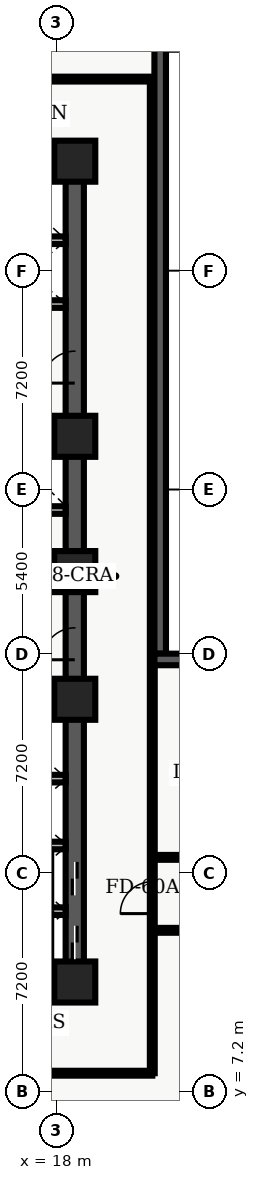
"""IFC4 building model, lengths in metres.
Left out: names, types, materials, properties, quantities, classifications, styles, units other than length and angle.
Written with IfcOpenShell. Run it as: python <this file> out.ifc"""

import sys

from ifc_helpers import new_model, entity, si_unit, converted_unit, direction, frame, origin_with_axes, origin_2d_with_axis, place, context, subcontext, project, spatial, polyline, rectangle, outline, extrude, element, fill, save


model = new_model("IFC4")
c1 = context("Model", 3, precision=1e-05, world=origin_with_axes(), true_north=direction((0.0, 1.0)))
c2 = subcontext(c1, "Body", "Model", "MODEL_VIEW")
j1 = project(units=[si_unit("LENGTHUNIT", "METRE"), converted_unit("PLANEANGLEUNIT", "DEGREE", entity("IfcPlaneAngleMeasure", 0.017), si_unit("PLANEANGLEUNIT", "RADIAN"), dimensions=[0, 0, 0, 0, 0, 0, 0])], contexts=[c1])
p1 = place(None, origin_with_axes())
s1 = spatial("IfcSite", under=j1, at=p1, CompositionType="ELEMENT")
p2 = place(p1, origin_with_axes())
s2 = spatial("IfcBuilding", under=s1, at=p2, CompositionType="ELEMENT")
p3 = place(p2, frame((0.0, 0.0, 36.6), z_axis=(0.0, 0.0, 1.0), x_axis=(1.0, 0.0, 0.0)))
s3 = spatial("IfcBuildingStorey", under=s2, at=p3, CompositionType="ELEMENT", Elevation=36.6)
p4 = place(p3, frame((11.4, 10.8, 0.0), z_axis=(0.0, 0.0, 1.0), x_axis=(1.0, 0.0, 0.0)))
e1 = element("IfcWall", 1, at=p4, inside=s3, PredefinedType="SHEAR", context=c2, shape_type="SweptSolid", body=[
    extrude(outline(polyline([(0.0, -0.3), (7.2, -0.3), (7.2, 0.3), (0.0, 0.3), (0.0, -0.3)])), origin_with_axes(), (0.0, 0.0, 1.0), 3.66),
])
p5 = place(p4, frame((2.625, 0.0, 0.0), z_axis=(0.0, 0.0, 1.0), x_axis=(1.0, 0.0, 0.0)))
e2 = element("IfcOpeningElement", 2, at=p5, cuts=e1, PredefinedType="OPENING", context=c2, shape_type="SweptSolid", body=[
    extrude(rectangle(XDim=1.05, YDim=0.62, at=origin_2d_with_axis()), origin_with_axes(), (0.0, 0.0, 1.0), 2.15),
])
p6 = place(p3, frame((11.4, 37.8, 0.0), z_axis=(0.0, 0.0, 1.0), x_axis=(1.0, 0.0, 0.0)))
e3 = element("IfcWall", 3, at=p6, inside=s3, PredefinedType="SHEAR", context=c2, shape_type="SweptSolid", body=[
    extrude(outline(polyline([(0.0, -0.3), (7.2, -0.3), (7.2, 0.3), (0.0, 0.3), (0.0, -0.3)])), origin_with_axes(), (0.0, 0.0, 1.0), 3.66),
])
p7 = place(p6, frame((2.625, 0.0, 0.0), z_axis=(0.0, 0.0, 1.0), x_axis=(1.0, 0.0, 0.0)))
e4 = element("IfcOpeningElement", 4, at=p7, cuts=e3, PredefinedType="OPENING", context=c2, shape_type="SweptSolid", body=[
    extrude(rectangle(XDim=1.05, YDim=0.62, at=origin_2d_with_axis()), origin_with_axes(), (0.0, 0.0, 1.0), 2.15),
])
p8 = place(p3, frame((18.6, 10.8, 0.0), z_axis=(0.0, 0.0, 1.0), x_axis=(0.0, 1.0, 0.0)))
e5 = element("IfcWall", 5, at=p8, inside=s3, PredefinedType="SHEAR", context=c2, shape_type="SweptSolid", body=[
    extrude(outline(polyline([(0.0, -0.3), (13.5, -0.3), (13.5, 0.3), (0.0, 0.3), (0.0, -0.3)])), origin_with_axes(), (0.0, 0.0, 1.0), 3.66),
])
p9 = place(p8, frame((1.3, 0.0, 0.0), z_axis=(0.0, 0.0, 1.0), x_axis=(1.0, 0.0, 0.0)))
e6 = element("IfcOpeningElement", 6, at=p9, cuts=e5, PredefinedType="OPENING", context=c2, shape_type="SweptSolid", body=[
    extrude(rectangle(XDim=1.1, YDim=0.62, at=origin_2d_with_axis()), origin_with_axes(), (0.0, 0.0, 1.0), 2.15),
])
p10 = place(p8, frame((3.4, 0.0, 0.0), z_axis=(0.0, 0.0, 1.0), x_axis=(1.0, 0.0, 0.0)))
e7 = element("IfcOpeningElement", 7, at=p10, cuts=e5, PredefinedType="OPENING", context=c2, shape_type="SweptSolid", body=[
    extrude(rectangle(XDim=1.1, YDim=0.62, at=origin_2d_with_axis()), origin_with_axes(), (0.0, 0.0, 1.0), 2.15),
])
p11 = place(p8, frame((11.125, 0.0, 0.0), z_axis=(0.0, 0.0, 1.0), x_axis=(1.0, 0.0, 0.0)))
e8 = element("IfcOpeningElement", 8, at=p11, cuts=e5, PredefinedType="OPENING", context=c2, shape_type="SweptSolid", body=[
    extrude(rectangle(XDim=1.05, YDim=0.62, at=origin_2d_with_axis()), origin_with_axes(), (0.0, 0.0, 1.0), 2.15),
])
p12 = place(p3, frame((18.6, 24.3, 0.0), z_axis=(0.0, 0.0, 1.0), x_axis=(0.0, 1.0, 0.0)))
e9 = element("IfcWall", 9, at=p12, inside=s3, PredefinedType="SHEAR", context=c2, shape_type="SweptSolid", body=[
    extrude(outline(polyline([(0.0, -0.3), (13.5, -0.3), (13.5, 0.3), (0.0, 0.3), (0.0, -0.3)])), origin_with_axes(), (0.0, 0.0, 1.0), 3.66),
])
p13 = place(p12, frame((6.725, 0.0, 0.0), z_axis=(0.0, 0.0, 1.0), x_axis=(1.0, 0.0, 0.0)))
e10 = element("IfcOpeningElement", 10, at=p13, cuts=e9, PredefinedType="OPENING", context=c2, shape_type="SweptSolid", body=[
    extrude(rectangle(XDim=1.05, YDim=0.62, at=origin_2d_with_axis()), origin_with_axes(), (0.0, 0.0, 1.0), 2.15),
])
for number, where, z_axis, x_axis in (
    (11, (11.7, 19.825, 0.0), (0.0, 0.0, 1.0), (1.0, 0.0, 0.0)),
    (12, (11.7, 28.775, 0.0), (0.0, 0.0, 1.0), (1.0, 0.0, 0.0)),
):
    element("IfcWall", number, at=place(p3, frame(where, z_axis=z_axis, x_axis=x_axis)), inside=s3, PredefinedType="SHEAR", context=c2, shape_type="SweptSolid", body=[
        extrude(outline(polyline([(0.0, -0.125), (6.6, -0.125), (6.6, 0.125), (0.0, 0.125), (0.0, -0.125)])), origin_with_axes(), (0.0, 0.0, 1.0), 3.66),
    ])
p14 = place(p3, frame((11.7, 24.1, 0.0), z_axis=(0.0, 0.0, 1.0), x_axis=(1.0, 0.0, 0.0)))
e13 = element("IfcWall", 13, at=p14, inside=s3, PredefinedType="SOLIDWALL", context=c2, shape_type="SweptSolid", body=[
    extrude(outline(polyline([(0.0, -0.125), (6.6, -0.125), (6.6, 0.125), (0.0, 0.125), (0.0, -0.125)])), origin_with_axes(), (0.0, 0.0, 1.0), 2.7),
])
p15 = place(p14, frame((3.75, 0.0, 0.0), z_axis=(0.0, 0.0, 1.0), x_axis=(1.0, 0.0, 0.0)))
e14 = element("IfcOpeningElement", 14, at=p15, cuts=e13, PredefinedType="OPENING", context=c2, shape_type="SweptSolid", body=[
    extrude(rectangle(XDim=0.9, YDim=0.27, at=origin_2d_with_axis()), origin_with_axes(), (0.0, 0.0, 1.0), 2.15),
])
p16 = place(p3, frame((11.7, 26.325, 0.0), z_axis=(0.0, 0.0, 1.0), x_axis=(1.0, 0.0, 0.0)))
e15 = element("IfcWall", 15, at=p16, inside=s3, PredefinedType="SOLIDWALL", context=c2, shape_type="SweptSolid", body=[
    extrude(outline(polyline([(0.0, -0.125), (6.6, -0.125), (6.6, 0.125), (0.0, 0.125), (0.0, -0.125)])), origin_with_axes(), (0.0, 0.0, 1.0), 2.7),
])
p17 = place(p16, frame((3.5, 0.0, 0.0), z_axis=(0.0, 0.0, 1.0), x_axis=(1.0, 0.0, 0.0)))
e16 = element("IfcOpeningElement", 16, at=p17, cuts=e15, PredefinedType="OPENING", context=c2, shape_type="SweptSolid", body=[
    extrude(rectangle(XDim=0.9, YDim=0.27, at=origin_2d_with_axis()), origin_with_axes(), (0.0, 0.0, 1.0), 2.15),
])
for number, where, z_axis, x_axis in (
    (17, (18.6, 10.8, 0.0), (0.0, 0.0, 1.0), (1.0, 0.0, 0.0)),
    (18, (18.6, 20.1, 0.0), (0.0, 0.0, 1.0), (1.0, 0.0, 0.0)),
    (19, (18.6, 24.3, 0.0), (0.0, 0.0, 1.0), (1.0, 0.0, 0.0)),
    (20, (18.6, 28.75, 0.0), (0.0, 0.0, 1.0), (1.0, 0.0, 0.0)),
    (21, (18.6, 37.8, 0.0), (0.0, 0.0, 1.0), (1.0, 0.0, 0.0)),
):
    element("IfcColumn", number, at=place(p3, frame(where, z_axis=z_axis, x_axis=x_axis)), inside=s3, PredefinedType="COLUMN", context=c2, shape_type="SweptSolid", body=[
        extrude(rectangle(XDim=1.35, YDim=1.35, at=origin_2d_with_axis()), origin_with_axes(), (0.0, 0.0, 1.0), 3.9),
    ])
for number, where, z_axis, x_axis in (
    (22, (15.84, 13.13, 0.0), (0.0, 0.0, 1.0), (1.0, 0.0, 0.0)),
    (23, (15.84, 15.29, 0.0), (0.0, 0.0, 1.0), (1.0, 0.0, 0.0)),
    (24, (15.84, 17.49, 0.0), (0.0, 0.0, 1.0), (1.0, 0.0, 0.0)),
    (25, (15.84, 33.1, 0.0), (0.0, 0.0, 1.0), (1.0, 0.0, 0.0)),
    (26, (15.84, 35.2, 0.0), (0.0, 0.0, 1.0), (1.0, 0.0, 0.0)),
):
    element("IfcWall", number, at=place(p3, frame(where, z_axis=z_axis, x_axis=x_axis)), inside=s3, PredefinedType="SOLIDWALL", context=c2, shape_type="SweptSolid", body=[
        extrude(outline(polyline([(0.0, -0.125), (2.46, -0.125), (2.46, 0.125), (0.0, 0.125), (0.0, -0.125)])), origin_with_axes(), (0.0, 0.0, 1.0), 2.7),
    ])
p18 = place(p3, frame((2.6, 7.8, 0.0), z_axis=(0.0, 0.0, 1.0), x_axis=(1.0, 0.0, 0.0)))
e27 = element("IfcWall", 27, at=p18, inside=s3, PredefinedType="PARTITIONING", context=c2, shape_type="SweptSolid", body=[
    extrude(outline(polyline([(0.0, -0.08), (18.55, -0.08), (18.55, 0.08), (0.0, 0.08), (0.0, -0.08)])), origin_with_axes(), (0.0, 0.0, 1.0), 2.7),
])
p19 = place(p18, frame((3.765, 0.0, 0.0), z_axis=(0.0, 0.0, 1.0), x_axis=(1.0, 0.0, 0.0)))
e28 = element("IfcOpeningElement", 28, at=p19, cuts=e27, PredefinedType="OPENING", context=c2, shape_type="SweptSolid", body=[
    extrude(rectangle(XDim=1.0, YDim=0.18, at=origin_2d_with_axis()), origin_with_axes(), (0.0, 0.0, 1.0), 2.15),
])
p20 = place(p18, frame((13.3, 0.0, 0.0), z_axis=(0.0, 0.0, 1.0), x_axis=(1.0, 0.0, 0.0)))
e29 = element("IfcOpeningElement", 29, at=p20, cuts=e27, PredefinedType="OPENING", context=c2, shape_type="SweptSolid", body=[
    extrude(rectangle(XDim=1.0, YDim=0.18, at=origin_2d_with_axis()), origin_with_axes(), (0.0, 0.0, 1.0), 2.15),
])
p21 = place(p3, frame((2.6, 40.5, 0.0), z_axis=(0.0, 0.0, 1.0), x_axis=(1.0, 0.0, 0.0)))
e30 = element("IfcWall", 30, at=p21, inside=s3, PredefinedType="PARTITIONING", context=c2, shape_type="SweptSolid", body=[
    extrude(outline(polyline([(0.0, -0.08), (18.65, -0.08), (18.65, 0.08), (0.0, 0.08), (0.0, -0.08)])), origin_with_axes(), (0.0, 0.0, 1.0), 2.7),
])
p22 = place(p21, frame((4.395, 0.0, 0.0), z_axis=(0.0, 0.0, 1.0), x_axis=(1.0, 0.0, 0.0)))
e31 = element("IfcOpeningElement", 31, at=p22, cuts=e30, PredefinedType="OPENING", context=c2, shape_type="SweptSolid", body=[
    extrude(rectangle(XDim=1.2, YDim=0.18, at=origin_2d_with_axis()), origin_with_axes(), (0.0, 0.0, 1.0), 2.2),
])
p23 = place(p21, frame((12.61, 0.0, 0.0), z_axis=(0.0, 0.0, 1.0), x_axis=(1.0, 0.0, 0.0)))
e32 = element("IfcOpeningElement", 32, at=p23, cuts=e30, PredefinedType="OPENING", context=c2, shape_type="SweptSolid", body=[
    extrude(rectangle(XDim=1.0, YDim=0.18, at=origin_2d_with_axis()), origin_with_axes(), (0.0, 0.0, 1.0), 2.15),
])
p24 = place(p3, frame((21.15, 7.8, 0.0), z_axis=(0.0, 0.0, 1.0), x_axis=(0.0, 1.0, 0.0)))
e33 = element("IfcWall", 33, at=p24, inside=s3, PredefinedType="PARTITIONING", context=c2, shape_type="SweptSolid", body=[
    extrude(outline(polyline([(0.0, -0.08), (32.7, -0.08), (32.7, 0.08), (0.0, 0.08), (0.0, -0.08)])), origin_with_axes(), (0.0, 0.0, 1.0), 2.7),
])
p25 = place(p24, frame((5.775, 0.0, 0.0), z_axis=(0.0, 0.0, 1.0), x_axis=(1.0, 0.0, 0.0)))
e34 = element("IfcOpeningElement", 34, at=p25, cuts=e33, PredefinedType="OPENING", context=c2, shape_type="SweptSolid", body=[
    extrude(rectangle(XDim=1.05, YDim=0.18, at=origin_2d_with_axis()), origin_with_axes(), (0.0, 0.0, 1.0), 2.15),
])
p26 = place(p3, frame((21.15, 12.5, 0.0), z_axis=(0.0, 0.0, 1.0), x_axis=(1.0, 0.0, 0.0)))
e35 = element("IfcWall", 35, at=p26, inside=s3, PredefinedType="PARTITIONING", context=c2, shape_type="SweptSolid", body=[
    extrude(outline(polyline([(0.0, -0.08), (15.2, -0.08), (15.2, 0.08), (0.0, 0.08), (0.0, -0.08)])), origin_with_axes(), (0.0, 0.0, 1.0), 2.7),
])
p27 = place(p26, frame((3.508, 0.0, 0.0), z_axis=(0.0, 0.0, 1.0), x_axis=(1.0, 0.0, 0.0)))
e36 = element("IfcOpeningElement", 36, at=p27, cuts=e35, PredefinedType="OPENING", context=c2, shape_type="SweptSolid", body=[
    extrude(rectangle(XDim=1.0, YDim=0.18, at=origin_2d_with_axis()), origin_with_axes(), (0.0, 0.0, 1.0), 2.15),
])
p28 = place(p26, frame((10.978, 0.0, 0.0), z_axis=(0.0, 0.0, 1.0), x_axis=(1.0, 0.0, 0.0)))
e37 = element("IfcOpeningElement", 37, at=p28, cuts=e35, PredefinedType="OPENING", context=c2, shape_type="SweptSolid", body=[
    extrude(rectangle(XDim=1.2, YDim=0.18, at=origin_2d_with_axis()), origin_with_axes(), (0.0, 0.0, 1.0), 2.2),
])
p29 = place(p3, frame((21.15, 14.9, 0.0), z_axis=(0.0, 0.0, 1.0), x_axis=(1.0, 0.0, 0.0)))
e38 = element("IfcWall", 38, at=p29, inside=s3, PredefinedType="PARTITIONING", context=c2, shape_type="SweptSolid", body=[
    extrude(outline(polyline([(0.0, -0.08), (15.2, -0.08), (15.2, 0.08), (0.0, 0.08), (0.0, -0.08)])), origin_with_axes(), (0.0, 0.0, 1.0), 2.7),
])
p30 = place(p29, frame((3.49, 0.0, 0.0), z_axis=(0.0, 0.0, 1.0), x_axis=(1.0, 0.0, 0.0)))
e39 = element("IfcOpeningElement", 39, at=p30, cuts=e38, PredefinedType="OPENING", context=c2, shape_type="SweptSolid", body=[
    extrude(rectangle(XDim=1.0, YDim=0.18, at=origin_2d_with_axis()), origin_with_axes(), (0.0, 0.0, 1.0), 2.15),
])
p31 = place(p29, frame((10.96, 0.0, 0.0), z_axis=(0.0, 0.0, 1.0), x_axis=(1.0, 0.0, 0.0)))
e40 = element("IfcOpeningElement", 40, at=p31, cuts=e38, PredefinedType="OPENING", context=c2, shape_type="SweptSolid", body=[
    extrude(rectangle(XDim=1.0, YDim=0.18, at=origin_2d_with_axis()), origin_with_axes(), (0.0, 0.0, 1.0), 2.15),
])
p32 = place(p3, frame((21.41, 45.82, 0.0), z_axis=(0.0, 0.0, 1.0), x_axis=(0.0, -1.0, 0.0)))
e41 = element("IfcWall", 41, at=p32, inside=s3, PredefinedType="SOLIDWALL", context=c2, shape_type="SweptSolid", body=[
    extrude(outline(polyline([(0.0, -0.19), (24.22, -0.19), (24.22, 0.19), (0.0, 0.19), (0.0, -0.19)])), origin_with_axes(), (0.0, 0.0, 1.0), 3.66),
])
p33 = place(p32, frame((2.902, 0.0, 0.45), z_axis=(0.0, 0.0, 1.0), x_axis=(1.0, 0.0, 0.0)))
e42 = element("IfcOpeningElement", 42, at=p33, cuts=e41, PredefinedType="OPENING", context=c2, shape_type="SweptSolid", body=[
    extrude(rectangle(XDim=2.1, YDim=0.4, at=origin_2d_with_axis()), origin_with_axes(), (0.0, 0.0, 1.0), 2.2),
])
p34 = place(p3, frame((21.22, 21.41, 0.0), z_axis=(0.0, 0.0, 1.0), x_axis=(1.0, 0.0, 0.0)))
e43 = element("IfcWall", 43, at=p34, inside=s3, PredefinedType="SOLIDWALL", context=c2, shape_type="SweptSolid", body=[
    extrude(outline(polyline([(0.0, -0.19), (17.18, -0.19), (17.18, 0.19), (0.0, 0.19), (0.0, -0.19)])), origin_with_axes(), (0.0, 0.0, 1.0), 3.66),
])
p35 = place(p34, frame((3.263, 0.0, 0.45), z_axis=(0.0, 0.0, 1.0), x_axis=(1.0, 0.0, 0.0)))
e44 = element("IfcOpeningElement", 44, at=p35, cuts=e43, PredefinedType="OPENING", context=c2, shape_type="SweptSolid", body=[
    extrude(rectangle(XDim=2.1, YDim=0.4, at=origin_2d_with_axis()), origin_with_axes(), (0.0, 0.0, 1.0), 2.2),
])
p36 = place(p34, frame((8.59, 0.0, 0.45), z_axis=(0.0, 0.0, 1.0), x_axis=(1.0, 0.0, 0.0)))
e45 = element("IfcOpeningElement", 45, at=p36, cuts=e43, PredefinedType="OPENING", context=c2, shape_type="SweptSolid", body=[
    extrude(rectangle(XDim=2.1, YDim=0.4, at=origin_2d_with_axis()), origin_with_axes(), (0.0, 0.0, 1.0), 2.2),
])
p37 = place(p34, frame((13.467, 0.0, 0.45), z_axis=(0.0, 0.0, 1.0), x_axis=(1.0, 0.0, 0.0)))
e46 = element("IfcOpeningElement", 46, at=p37, cuts=e43, PredefinedType="OPENING", context=c2, shape_type="SweptSolid", body=[
    extrude(rectangle(XDim=2.1, YDim=0.4, at=origin_2d_with_axis()), origin_with_axes(), (0.0, 0.0, 1.0), 2.2),
])
p38 = place(p8, frame((1.3, 0.0, 0.0), z_axis=(0.0, 0.0, 1.0), x_axis=(1.0, 0.0, 0.0)))
e47 = element("IfcDoor", 47, at=p38, inside=s3, OperationType="SLIDING_TO_LEFT", PredefinedType="DOOR", context=c2, shape_type="SweptSolid", body=[
    extrude(rectangle(XDim=1.1, YDim=0.09, at=origin_2d_with_axis()), origin_with_axes(), (0.0, 0.0, 1.0), 2.15),
])
fill(e6, e47)
p39 = place(p8, frame((3.4, 0.0, 0.0), z_axis=(0.0, 0.0, 1.0), x_axis=(1.0, 0.0, 0.0)))
e48 = element("IfcDoor", 48, at=p39, inside=s3, OperationType="SLIDING_TO_RIGHT", PredefinedType="DOOR", context=c2, shape_type="SweptSolid", body=[
    extrude(rectangle(XDim=1.1, YDim=0.09, at=origin_2d_with_axis()), origin_with_axes(), (0.0, 0.0, 1.0), 2.15),
])
fill(e7, e48)
p40 = place(p8, frame((11.125, 0.0, 0.0), z_axis=(0.0, 0.0, 1.0), x_axis=(1.0, 0.0, 0.0)))
e49 = element("IfcDoor", 49, at=p40, inside=s3, OperationType="SINGLE_SWING_LEFT", PredefinedType="DOOR", context=c2, shape_type="SweptSolid", body=[
    extrude(rectangle(XDim=1.05, YDim=0.09, at=origin_2d_with_axis()), origin_with_axes(), (0.0, 0.0, 1.0), 2.15),
])
fill(e8, e49)
p41 = place(p12, frame((6.725, 0.0, 0.0), z_axis=(0.0, 0.0, 1.0), x_axis=(1.0, 0.0, 0.0)))
e50 = element("IfcDoor", 50, at=p41, inside=s3, OperationType="SINGLE_SWING_LEFT", PredefinedType="DOOR", context=c2, shape_type="SweptSolid", body=[
    extrude(rectangle(XDim=1.05, YDim=0.09, at=origin_2d_with_axis()), origin_with_axes(), (0.0, 0.0, 1.0), 2.15),
])
fill(e10, e50)
p42 = place(p24, frame((5.775, 0.0, 0.0), z_axis=(0.0, 0.0, 1.0), x_axis=(1.0, 0.0, 0.0)))
e51 = element("IfcDoor", 51, at=p42, inside=s3, OperationType="SINGLE_SWING_LEFT", PredefinedType="DOOR", context=c2, shape_type="SweptSolid", body=[
    extrude(rectangle(XDim=1.05, YDim=0.09, at=origin_2d_with_axis()), origin_with_axes(), (0.0, 0.0, 1.0), 2.15),
])
fill(e34, e51)
save(model, sys.argv[1])
